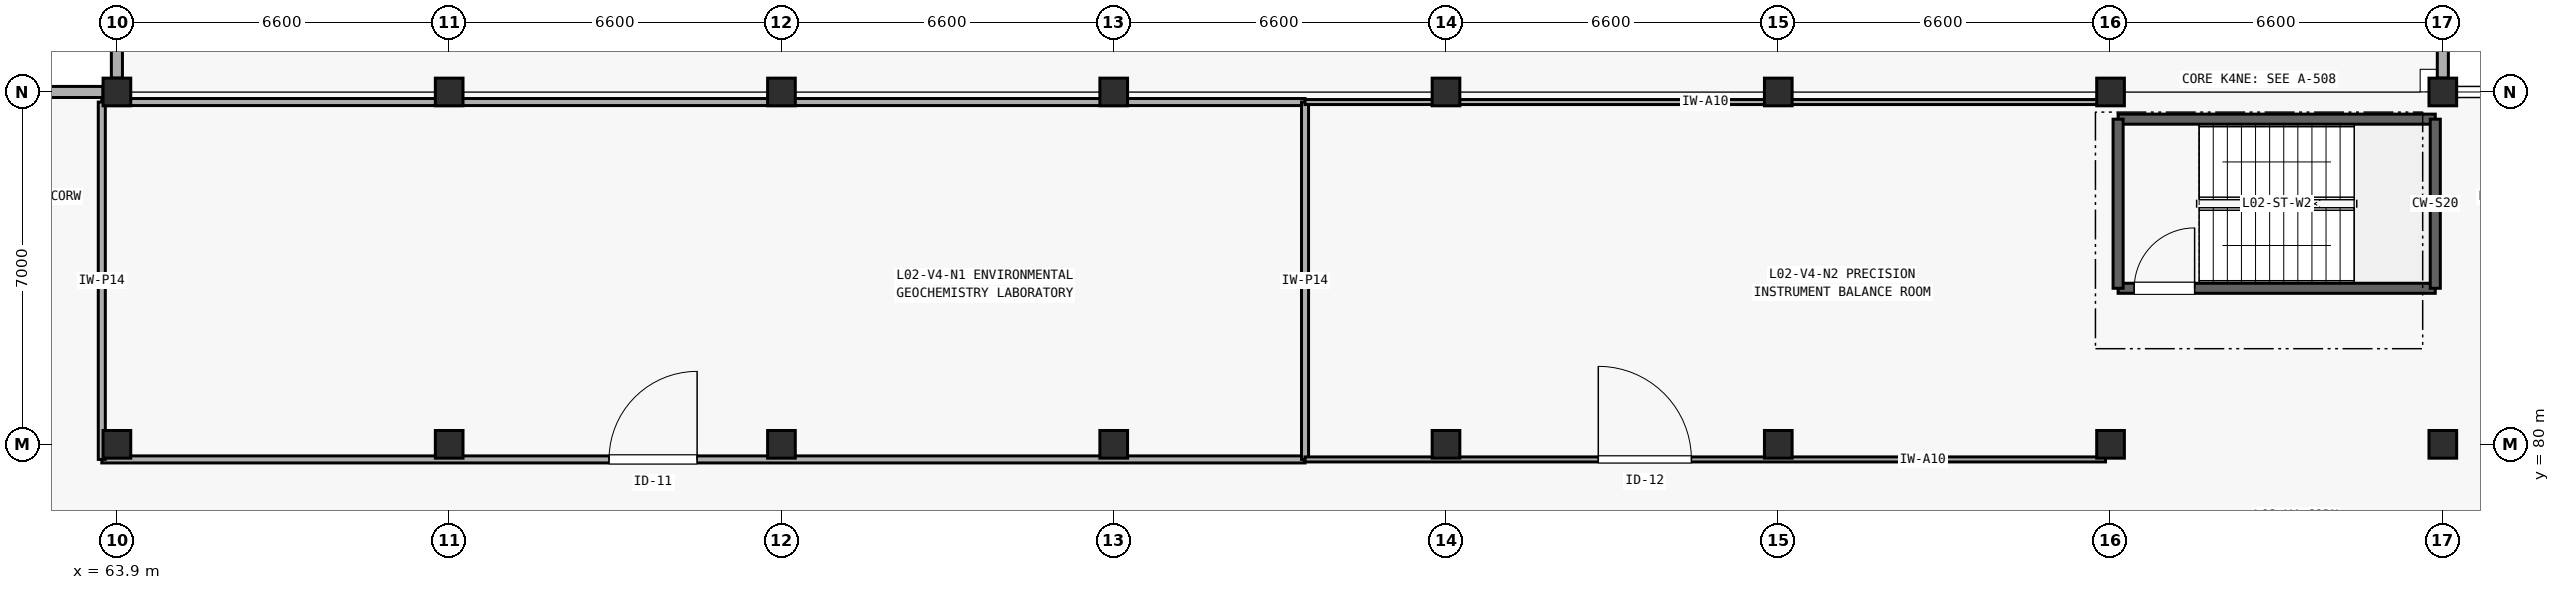
"""IFC4 building model, lengths in metres.
Left out: names, types, materials, properties, quantities, classifications, styles, units other than length and angle.
Written with IfcOpenShell. Run it as: python <this file> out.ifc"""

import sys

from ifc_helpers import new_model, si_unit, direction, frame, frame_2d, origin, origin_2d, place, context, subcontext, project, spatial, rectangle, extrude, element, fill, save


model = new_model("IFC4")
c1 = context("Model", 3, precision=1e-05, world=origin(), true_north=direction((0.0, 1.0)))
c2 = subcontext(c1, "Body", "Model", "MODEL_VIEW")
j1 = project(units=[si_unit("LENGTHUNIT", "METRE"), si_unit("PLANEANGLEUNIT", "RADIAN")], contexts=[c1])
p1 = place(None, origin())
s1 = spatial("IfcSite", under=j1, at=p1, CompositionType="ELEMENT")
p2 = place(p1, origin())
s2 = spatial("IfcBuilding", under=s1, at=p2, CompositionType="ELEMENT")
p3 = place(p2, frame((0.0, 0.0, 8.4)))
s3 = spatial("IfcBuildingStorey", under=s2, at=p3, CompositionType="ELEMENT", Elevation=8.4)
for number, where, z_axis, x_axis in (
    (1, (63.9, 80.0, 0.0), (0.0, 0.0, 1.0), (1.0, 0.0, 0.0)),
    (2, (63.9, 87.0, 0.0), (0.0, 0.0, 1.0), (1.0, 0.0, 0.0)),
    (3, (70.5, 80.0, 0.0), (0.0, 0.0, 1.0), (1.0, 0.0, 0.0)),
    (4, (70.5, 87.0, 0.0), (0.0, 0.0, 1.0), (1.0, 0.0, 0.0)),
    (5, (77.1, 80.0, 0.0), (0.0, 0.0, 1.0), (1.0, 0.0, 0.0)),
    (6, (77.1, 87.0, 0.0), (0.0, 0.0, 1.0), (1.0, 0.0, 0.0)),
    (7, (83.7, 80.0, 0.0), (0.0, 0.0, 1.0), (1.0, 0.0, 0.0)),
    (8, (83.7, 87.0, 0.0), (0.0, 0.0, 1.0), (1.0, 0.0, 0.0)),
    (9, (90.3, 80.0, 0.0), (0.0, 0.0, 1.0), (1.0, 0.0, 0.0)),
    (10, (90.3, 87.0, 0.0), (0.0, 0.0, 1.0), (1.0, 0.0, 0.0)),
    (11, (96.9, 80.0, 0.0), (0.0, 0.0, 1.0), (1.0, 0.0, 0.0)),
    (12, (96.9, 87.0, 0.0), (0.0, 0.0, 1.0), (1.0, 0.0, 0.0)),
    (13, (103.5, 80.0, 0.0), (0.0, 0.0, 1.0), (1.0, 0.0, 0.0)),
    (14, (103.5, 87.0, 0.0), (0.0, 0.0, 1.0), (1.0, 0.0, 0.0)),
    (15, (110.1, 80.0, 0.0), (0.0, 0.0, 1.0), (1.0, 0.0, 0.0)),
    (16, (110.1, 87.0, 0.0), (0.0, 0.0, 1.0), (1.0, 0.0, 0.0)),
):
    element("IfcColumn", number, at=place(p3, frame(where, z_axis=z_axis, x_axis=x_axis)), inside=s3, PredefinedType="COLUMN", context=c2, shape_type="SweptSolid", body=[
        extrude(rectangle(XDim=0.55, YDim=0.55, at=origin_2d()), origin(), (0.0, 0.0, 1.0), 4.2),
    ])
p4 = place(p3, frame((57.575, 87.0, 0.0), z_axis=(0.0, 0.0, 1.0), x_axis=(1.0, 0.0, 0.0)))
e17 = element("IfcWall", 17, at=p4, inside=s3, PredefinedType="SOLIDWALL", context=c2, shape_type="SweptSolid", body=[
    extrude(rectangle(XDim=6.05, YDim=0.22, at=frame_2d((3.025, 0.0))), origin(), (0.0, 0.0, 1.0), 3.135),
])
p5 = place(p4, frame((1.375, 0.0, 0.85)))
e18 = element("IfcOpeningElement", 18, at=p5, cuts=e17, PredefinedType="OPENING", context=c2, shape_type="SweptSolid", body=[
    extrude(rectangle(XDim=3.3, YDim=1.6, at=frame_2d((1.65, 0.8))), frame((0.0, 0.12, 0.0), z_axis=(0.0, -1.0, 0.0), x_axis=(1.0, 0.0, 0.0)), (0.0, 0.0, 1.0), 0.24),
])
p6 = place(p3, frame((63.9, 87.275, 0.0), z_axis=(0.0, 0.0, 1.0), x_axis=(0.0, 1.0, 0.0)))
e19 = element("IfcWall", 19, at=p6, inside=s3, PredefinedType="SOLIDWALL", context=c2, shape_type="SweptSolid", body=[
    extrude(rectangle(XDim=6.45, YDim=0.22, at=frame_2d((3.225, 0.0))), origin(), (0.0, 0.0, 1.0), 3.505),
])
p7 = place(p6, frame((2.5, 0.0, 0.85)))
e20 = element("IfcOpeningElement", 20, at=p7, cuts=e19, PredefinedType="OPENING", context=c2, shape_type="SweptSolid", body=[
    extrude(rectangle(XDim=1.45, YDim=1.55, at=frame_2d((0.725, 0.775))), frame((0.0, 0.12, 0.0), z_axis=(0.0, -1.0, 0.0), x_axis=(1.0, 0.0, 0.0)), (0.0, 0.0, 1.0), 0.24),
])
p8 = place(p3, frame((110.1, 87.275, 0.0), z_axis=(0.0, 0.0, 1.0), x_axis=(0.0, 1.0, 0.0)))
e21 = element("IfcWall", 21, at=p8, inside=s3, PredefinedType="SOLIDWALL", context=c2, shape_type="SweptSolid", body=[
    extrude(rectangle(XDim=6.45, YDim=0.22, at=frame_2d((3.225, 0.0))), origin(), (0.0, 0.0, 1.0), 3.465),
])
p9 = place(p8, frame((2.175, 0.0, 0.85)))
e22 = element("IfcOpeningElement", 22, at=p9, cuts=e21, PredefinedType="OPENING", context=c2, shape_type="SweptSolid", body=[
    extrude(rectangle(XDim=2.1, YDim=1.35, at=frame_2d((1.05, 0.675))), frame((0.0, 0.12, 0.0), z_axis=(0.0, -1.0, 0.0), x_axis=(1.0, 0.0, 0.0)), (0.0, 0.0, 1.0), 0.24),
])
p10 = place(p3, frame((103.65, 83.1, 0.0), z_axis=(0.0, 0.0, 1.0), x_axis=(1.0, 0.0, 0.0)))
e23 = element("IfcWall", 23, at=p10, inside=s3, PredefinedType="SHEAR", context=c2, shape_type="SweptSolid", body=[
    extrude(rectangle(XDim=6.3, YDim=0.2, at=frame_2d((3.15, 0.0))), origin(), (0.0, 0.0, 1.0), 4.2),
])
p11 = place(p10, frame((0.32, 0.0, 0.0)))
e24 = element("IfcOpeningElement", 24, at=p11, cuts=e23, PredefinedType="OPENING", context=c2, shape_type="SweptSolid", body=[
    extrude(rectangle(XDim=1.2, YDim=2.15, at=frame_2d((0.6, 1.075))), frame((0.0, 0.11, 0.0), z_axis=(0.0, -1.0, 0.0), x_axis=(1.0, 0.0, 0.0)), (0.0, 0.0, 1.0), 0.22),
])
p12 = place(p3, frame((103.65, 86.46, 0.0), z_axis=(0.0, 0.0, 1.0), x_axis=(1.0, 0.0, 0.0)))
e25 = element("IfcWall", 25, at=p12, inside=s3, PredefinedType="SHEAR", context=c2, shape_type="SweptSolid", body=[
    extrude(rectangle(XDim=6.3, YDim=0.2, at=frame_2d((3.15, 0.0))), origin(), (0.0, 0.0, 1.0), 4.2),
])
for number, where, z_axis, x_axis in (
    (26, (103.65, 83.1, 0.0), (0.0, 0.0, 1.0), (0.0, 1.0, 0.0)),
    (27, (109.95, 83.1, 0.0), (0.0, 0.0, 1.0), (0.0, 1.0, 0.0)),
):
    element("IfcWall", number, at=place(p3, frame(where, z_axis=z_axis, x_axis=x_axis)), inside=s3, PredefinedType="SHEAR", context=c2, shape_type="SweptSolid", body=[
        extrude(rectangle(XDim=3.36, YDim=0.2, at=frame_2d((1.68, 0.0))), origin(), (0.0, 0.0, 1.0), 4.2),
    ])
p13 = place(p3, frame((63.6, 79.7, 0.0), z_axis=(0.0, 0.0, 1.0), x_axis=(1.0, 0.0, 0.0)))
e28 = element("IfcWall", 28, at=p13, inside=s3, PredefinedType="PLUMBINGWALL", context=c2, shape_type="SweptSolid", body=[
    extrude(rectangle(XDim=23.9, YDim=0.14, at=frame_2d((11.95, 0.0))), origin(), (0.0, 0.0, 1.0), 3.235),
])
p14 = place(p13, frame((10.075, 0.0, 0.0)))
e29 = element("IfcOpeningElement", 29, at=p14, cuts=e28, PredefinedType="OPENING", context=c2, shape_type="SweptSolid", body=[
    extrude(rectangle(XDim=1.75, YDim=2.25, at=frame_2d((0.875, 1.125))), frame((0.0, 0.08, 0.0), z_axis=(0.0, -1.0, 0.0), x_axis=(1.0, 0.0, 0.0)), (0.0, 0.0, 1.0), 0.16),
])
p15 = place(p3, frame((63.6, 86.8, 0.0), z_axis=(0.0, 0.0, 1.0), x_axis=(1.0, 0.0, 0.0)))
e30 = element("IfcWall", 30, at=p15, inside=s3, PredefinedType="PLUMBINGWALL", context=c2, shape_type="SweptSolid", body=[
    extrude(rectangle(XDim=23.9, YDim=0.14, at=frame_2d((11.95, 0.0))), origin(), (0.0, 0.0, 1.0), 3.235),
])
p16 = place(p3, frame((63.6, 79.7, 0.0), z_axis=(0.0, 0.0, 1.0), x_axis=(0.0, 1.0, 0.0)))
e31 = element("IfcWall", 31, at=p16, inside=s3, PredefinedType="PLUMBINGWALL", context=c2, shape_type="SweptSolid", body=[
    extrude(rectangle(XDim=7.1, YDim=0.14, at=frame_2d((3.55, 0.0))), origin(), (0.0, 0.0, 1.0), 3.485),
])
p17 = place(p3, frame((87.5, 79.7, 0.0), z_axis=(0.0, 0.0, 1.0), x_axis=(0.0, 1.0, 0.0)))
e32 = element("IfcWall", 32, at=p17, inside=s3, PredefinedType="PLUMBINGWALL", context=c2, shape_type="SweptSolid", body=[
    extrude(rectangle(XDim=7.1, YDim=0.14, at=frame_2d((3.55, 0.0))), origin(), (0.0, 0.0, 1.0), 3.9),
])
p18 = place(p3, frame((87.5, 79.7, 0.0), z_axis=(0.0, 0.0, 1.0), x_axis=(1.0, 0.0, 0.0)))
e33 = element("IfcWall", 33, at=p18, inside=s3, PredefinedType="PARTITIONING", context=c2, shape_type="SweptSolid", body=[
    extrude(rectangle(XDim=15.9, YDim=0.1, at=frame_2d((7.95, 0.0))), origin(), (0.0, 0.0, 1.0), 3.365),
])
p19 = place(p18, frame((5.825, 0.0, 0.0)))
e34 = element("IfcOpeningElement", 34, at=p19, cuts=e33, PredefinedType="OPENING", context=c2, shape_type="SweptSolid", body=[
    extrude(rectangle(XDim=1.85, YDim=2.3, at=frame_2d((0.925, 1.15))), frame((0.0, 0.06, 0.0), z_axis=(0.0, -1.0, 0.0), x_axis=(1.0, 0.0, 0.0)), (0.0, 0.0, 1.0), 0.12),
])
p20 = place(p3, frame((87.5, 86.8, 0.0), z_axis=(0.0, 0.0, 1.0), x_axis=(1.0, 0.0, 0.0)))
e35 = element("IfcWall", 35, at=p20, inside=s3, PredefinedType="PARTITIONING", context=c2, shape_type="SweptSolid", body=[
    extrude(rectangle(XDim=15.9, YDim=0.1, at=frame_2d((7.95, 0.0))), origin(), (0.0, 0.0, 1.0), 3.365),
])
p21 = place(p11, origin())
e36 = element("IfcDoor", 36, at=p21, inside=s3, OperationType="SINGLE_SWING_RIGHT", PredefinedType="DOOR", context=c2, shape_type="SweptSolid", body=[
    extrude(rectangle(XDim=1.2, YDim=2.15, at=frame_2d((0.6, 1.075))), frame((0.0, 0.025, 0.0), z_axis=(0.0, -1.0, 0.0), x_axis=(1.0, 0.0, 0.0)), (0.0, 0.0, 1.0), 0.05),
])
fill(e24, e36)
p22 = place(p14, origin())
e37 = element("IfcDoor", 37, at=p22, inside=s3, OperationType="SINGLE_SWING_RIGHT", PredefinedType="DOOR", context=c2, shape_type="SweptSolid", body=[
    extrude(rectangle(XDim=1.75, YDim=2.25, at=frame_2d((0.875, 1.125))), frame((0.0, 0.025, 0.0), z_axis=(0.0, -1.0, 0.0), x_axis=(1.0, 0.0, 0.0)), (0.0, 0.0, 1.0), 0.05),
])
fill(e29, e37)
p23 = place(p19, origin())
e38 = element("IfcDoor", 38, at=p23, inside=s3, OperationType="SINGLE_SWING_LEFT", PredefinedType="DOOR", context=c2, shape_type="SweptSolid", body=[
    extrude(rectangle(XDim=1.85, YDim=2.3, at=frame_2d((0.925, 1.15))), frame((0.0, 0.025, 0.0), z_axis=(0.0, -1.0, 0.0), x_axis=(1.0, 0.0, 0.0)), (0.0, 0.0, 1.0), 0.05),
])
fill(e34, e38)
save(model, sys.argv[1])
